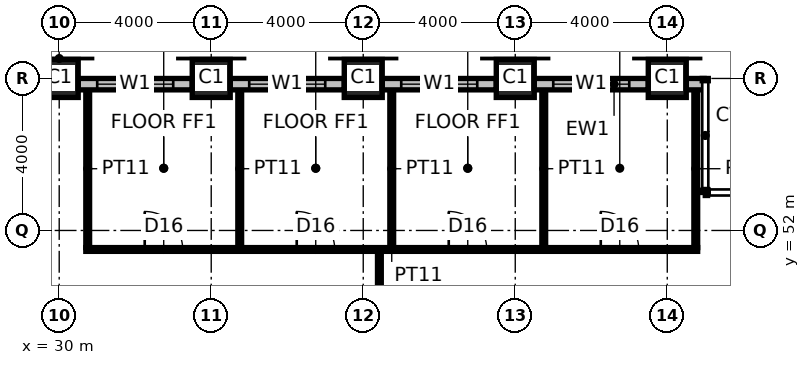
"""IFC4 building model, lengths in metres.
Left out: names, types, materials, properties, quantities, classifications, styles, units other than length and angle.
Written with IfcOpenShell. Run it as: python <this file> out.ifc"""

import sys

from ifc_helpers import new_model, si_unit, direction, frame, frame_2d, origin, origin_2d, place, context, subcontext, project, spatial, rectangle, hollow_rectangle, extrude, element, fill, save


model = new_model("IFC4")
c1 = context("Model", 3, precision=1e-05, world=origin(), true_north=direction((0.0, 1.0)))
c2 = subcontext(c1, "Body", "Model", "MODEL_VIEW")
j1 = project(units=[si_unit("LENGTHUNIT", "METRE"), si_unit("PLANEANGLEUNIT", "RADIAN")], contexts=[c1])
p1 = place(None, origin())
s1 = spatial("IfcSite", under=j1, at=p1, CompositionType="ELEMENT")
p2 = place(p1, origin())
s2 = spatial("IfcBuilding", under=s1, at=p2, CompositionType="ELEMENT")
p3 = place(p2, frame((0.0, 0.0, 214.2)))
s3 = spatial("IfcBuildingStorey", under=s2, at=p3, CompositionType="ELEMENT", Elevation=214.2)
for number, where, z_axis, x_axis in (
    (1, (30.0, 56.0, 0.0), (0.0, 0.0, 1.0), (1.0, 0.0, 0.0)),
    (2, (34.0, 56.0, 0.0), (0.0, 0.0, 1.0), (1.0, 0.0, 0.0)),
    (3, (38.0, 56.0, 0.0), (0.0, 0.0, 1.0), (1.0, 0.0, 0.0)),
    (4, (42.0, 56.0, 0.0), (0.0, 0.0, 1.0), (1.0, 0.0, 0.0)),
    (5, (46.0, 56.0, 0.0), (0.0, 0.0, 1.0), (1.0, 0.0, 0.0)),
):
    element("IfcColumn", number, at=place(p3, frame(where, z_axis=z_axis, x_axis=x_axis)), inside=s3, PredefinedType="COLUMN", context=c2, shape_type="SweptSolid", body=[
        extrude(hollow_rectangle(XDim=1.0, YDim=1.0, WallThickness=0.1, at=origin_2d()), origin(), (0.0, 0.0, 1.0), 4.0),
    ])
p4 = place(p3, frame((30.7, 51.5, 0.0), z_axis=(0.0, 0.0, 1.0), x_axis=(1.0, 0.0, 0.0)))
e6 = element("IfcWall", 6, at=p4, inside=s3, PredefinedType="PARTITIONING", context=c2, shape_type="SweptSolid", body=[
    extrude(rectangle(XDim=16.1, YDim=0.1, at=frame_2d((8.05, 0.0))), origin(), (0.0, 0.0, 1.0), 3.85),
])
p5 = place(p4, frame((1.55, 0.0, 0.0)))
e7 = element("IfcOpeningElement", 7, at=p5, cuts=e6, PredefinedType="OPENING", context=c2, shape_type="SweptSolid", body=[
    extrude(rectangle(XDim=1.0, YDim=2.2, at=frame_2d((0.5, 1.1))), frame((0.0, 0.06, 0.0), z_axis=(0.0, -1.0, 0.0), x_axis=(1.0, 0.0, 0.0)), (0.0, 0.0, 1.0), 0.12),
])
p6 = place(p4, frame((5.55, 0.0, 0.0)))
e8 = element("IfcOpeningElement", 8, at=p6, cuts=e6, PredefinedType="OPENING", context=c2, shape_type="SweptSolid", body=[
    extrude(rectangle(XDim=1.0, YDim=2.2, at=frame_2d((0.5, 1.1))), frame((0.0, 0.06, 0.0), z_axis=(0.0, -1.0, 0.0), x_axis=(1.0, 0.0, 0.0)), (0.0, 0.0, 1.0), 0.12),
])
p7 = place(p4, frame((9.55, 0.0, 0.0)))
e9 = element("IfcOpeningElement", 9, at=p7, cuts=e6, PredefinedType="OPENING", context=c2, shape_type="SweptSolid", body=[
    extrude(rectangle(XDim=1.0, YDim=2.2, at=frame_2d((0.5, 1.1))), frame((0.0, 0.06, 0.0), z_axis=(0.0, -1.0, 0.0), x_axis=(1.0, 0.0, 0.0)), (0.0, 0.0, 1.0), 0.12),
])
p8 = place(p4, frame((13.55, 0.0, 0.0)))
e10 = element("IfcOpeningElement", 10, at=p8, cuts=e6, PredefinedType="OPENING", context=c2, shape_type="SweptSolid", body=[
    extrude(rectangle(XDim=1.0, YDim=2.2, at=frame_2d((0.5, 1.1))), frame((0.0, 0.06, 0.0), z_axis=(0.0, -1.0, 0.0), x_axis=(1.0, 0.0, 0.0)), (0.0, 0.0, 1.0), 0.12),
])
for number, where, z_axis, x_axis in (
    (11, (30.75, 51.55, 0.0), (0.0, 0.0, 1.0), (0.0, 1.0, 0.0)),
    (12, (34.75, 51.55, 0.0), (0.0, 0.0, 1.0), (0.0, 1.0, 0.0)),
    (13, (38.75, 51.55, 0.0), (0.0, 0.0, 1.0), (0.0, 1.0, 0.0)),
    (14, (42.75, 51.55, 0.0), (0.0, 0.0, 1.0), (0.0, 1.0, 0.0)),
    (15, (46.75, 51.55, 0.0), (0.0, 0.0, 1.0), (0.0, 1.0, 0.0)),
):
    element("IfcWall", number, at=place(p3, frame(where, z_axis=z_axis, x_axis=x_axis)), inside=s3, PredefinedType="PARTITIONING", context=c2, shape_type="SweptSolid", body=[
        extrude(rectangle(XDim=4.15, YDim=0.1, at=frame_2d((2.075, 0.0))), origin(), (0.0, 0.0, 1.0), 3.85),
    ])
p9 = place(p3, frame((38.425, 51.45, 0.0), z_axis=(0.0, 0.0, 1.0), x_axis=(0.0, -1.0, 0.0)))
e16 = element("IfcWall", 16, at=p9, inside=s3, PredefinedType="PARTITIONING", context=c2, shape_type="SweptSolid", body=[
    extrude(rectangle(XDim=14.95, YDim=0.1, at=frame_2d((7.475, 0.0))), origin(), (0.0, 0.0, 1.0), 2.95),
])
p10 = place(p9, frame((6.975, 0.0, 0.0)))
e17 = element("IfcOpeningElement", 17, at=p10, cuts=e16, PredefinedType="OPENING", context=c2, shape_type="SweptSolid", body=[
    extrude(rectangle(XDim=1.0, YDim=2.2, at=frame_2d((0.5, 1.1))), frame((0.0, 0.06, 0.0), z_axis=(0.0, -1.0, 0.0), x_axis=(1.0, 0.0, 0.0)), (0.0, 0.0, 1.0), 0.12),
])
p11 = place(p3, frame((33.5, 55.85, 0.0), z_axis=(0.0, 0.0, 1.0), x_axis=(-1.0, 0.0, 0.0)))
e18 = element("IfcWall", 18, at=p11, inside=s3, PredefinedType="ELEMENTEDWALL", context=c2, shape_type="SweptSolid", body=[
    extrude(rectangle(XDim=3.0, YDim=0.3, at=frame_2d((1.5, 0.0))), origin(), (0.0, 0.0, 1.0), 2.85),
])
p12 = place(p11, frame((0.5, 0.0, 0.8)))
e19 = element("IfcOpeningElement", 19, at=p12, cuts=e18, PredefinedType="OPENING", context=c2, shape_type="SweptSolid", body=[
    extrude(rectangle(XDim=2.0, YDim=2.0, at=frame_2d((1.0, 1.0))), frame((0.0, 0.16, 0.0), z_axis=(0.0, -1.0, 0.0), x_axis=(1.0, 0.0, 0.0)), (0.0, 0.0, 1.0), 0.32),
])
p13 = place(p3, frame((37.5, 55.85, 0.0), z_axis=(0.0, 0.0, 1.0), x_axis=(-1.0, 0.0, 0.0)))
e20 = element("IfcWall", 20, at=p13, inside=s3, PredefinedType="ELEMENTEDWALL", context=c2, shape_type="SweptSolid", body=[
    extrude(rectangle(XDim=3.0, YDim=0.3, at=frame_2d((1.5, 0.0))), origin(), (0.0, 0.0, 1.0), 2.85),
])
p14 = place(p13, frame((0.5, 0.0, 0.8)))
e21 = element("IfcOpeningElement", 21, at=p14, cuts=e20, PredefinedType="OPENING", context=c2, shape_type="SweptSolid", body=[
    extrude(rectangle(XDim=2.0, YDim=2.0, at=frame_2d((1.0, 1.0))), frame((0.0, 0.16, 0.0), z_axis=(0.0, -1.0, 0.0), x_axis=(1.0, 0.0, 0.0)), (0.0, 0.0, 1.0), 0.32),
])
p15 = place(p3, frame((41.5, 55.85, 0.0), z_axis=(0.0, 0.0, 1.0), x_axis=(-1.0, 0.0, 0.0)))
e22 = element("IfcWall", 22, at=p15, inside=s3, PredefinedType="ELEMENTEDWALL", context=c2, shape_type="SweptSolid", body=[
    extrude(rectangle(XDim=3.0, YDim=0.3, at=frame_2d((1.5, 0.0))), origin(), (0.0, 0.0, 1.0), 2.85),
])
p16 = place(p15, frame((0.5, 0.0, 0.8)))
e23 = element("IfcOpeningElement", 23, at=p16, cuts=e22, PredefinedType="OPENING", context=c2, shape_type="SweptSolid", body=[
    extrude(rectangle(XDim=2.0, YDim=2.0, at=frame_2d((1.0, 1.0))), frame((0.0, 0.16, 0.0), z_axis=(0.0, -1.0, 0.0), x_axis=(1.0, 0.0, 0.0)), (0.0, 0.0, 1.0), 0.32),
])
p17 = place(p3, frame((45.5, 55.85, 0.0), z_axis=(0.0, 0.0, 1.0), x_axis=(-1.0, 0.0, 0.0)))
e24 = element("IfcWall", 24, at=p17, inside=s3, PredefinedType="ELEMENTEDWALL", context=c2, shape_type="SweptSolid", body=[
    extrude(rectangle(XDim=3.0, YDim=0.3, at=frame_2d((1.5, 0.0))), origin(), (0.0, 0.0, 1.0), 2.85),
])
p18 = place(p17, frame((0.5, 0.0, 0.8)))
e25 = element("IfcOpeningElement", 25, at=p18, cuts=e24, PredefinedType="OPENING", context=c2, shape_type="SweptSolid", body=[
    extrude(rectangle(XDim=2.0, YDim=2.0, at=frame_2d((1.0, 1.0))), frame((0.0, 0.16, 0.0), z_axis=(0.0, -1.0, 0.0), x_axis=(1.0, 0.0, 0.0)), (0.0, 0.0, 1.0), 0.32),
])
p19 = place(p3, frame((46.97, 55.85, 0.0), z_axis=(0.0, 0.0, 1.0), x_axis=(-1.0, 0.0, 0.0)))
e26 = element("IfcWall", 26, at=p19, inside=s3, PredefinedType="ELEMENTEDWALL", context=c2, shape_type="SweptSolid", body=[
    extrude(rectangle(XDim=0.47, YDim=0.3, at=frame_2d((0.235, 0.0))), origin(), (0.0, 0.0, 1.0), 2.95),
])
p20 = place(p5, origin())
e27 = element("IfcDoor", 27, at=p20, inside=s3, OperationType="SINGLE_SWING_LEFT", PredefinedType="DOOR", context=c2, shape_type="SweptSolid", body=[
    extrude(rectangle(XDim=1.0, YDim=2.2, at=frame_2d((0.5, 1.1))), frame((0.0, 0.025, 0.0), z_axis=(0.0, -1.0, 0.0), x_axis=(1.0, 0.0, 0.0)), (0.0, 0.0, 1.0), 0.05),
])
fill(e7, e27)
p21 = place(p6, origin())
e28 = element("IfcDoor", 28, at=p21, inside=s3, OperationType="SINGLE_SWING_LEFT", PredefinedType="DOOR", context=c2, shape_type="SweptSolid", body=[
    extrude(rectangle(XDim=1.0, YDim=2.2, at=frame_2d((0.5, 1.1))), frame((0.0, 0.025, 0.0), z_axis=(0.0, -1.0, 0.0), x_axis=(1.0, 0.0, 0.0)), (0.0, 0.0, 1.0), 0.05),
])
fill(e8, e28)
p22 = place(p7, origin())
e29 = element("IfcDoor", 29, at=p22, inside=s3, OperationType="SINGLE_SWING_LEFT", PredefinedType="DOOR", context=c2, shape_type="SweptSolid", body=[
    extrude(rectangle(XDim=1.0, YDim=2.2, at=frame_2d((0.5, 1.1))), frame((0.0, 0.025, 0.0), z_axis=(0.0, -1.0, 0.0), x_axis=(1.0, 0.0, 0.0)), (0.0, 0.0, 1.0), 0.05),
])
fill(e9, e29)
p23 = place(p8, origin())
e30 = element("IfcDoor", 30, at=p23, inside=s3, OperationType="SINGLE_SWING_LEFT", PredefinedType="DOOR", context=c2, shape_type="SweptSolid", body=[
    extrude(rectangle(XDim=1.0, YDim=2.2, at=frame_2d((0.5, 1.1))), frame((0.0, 0.025, 0.0), z_axis=(0.0, -1.0, 0.0), x_axis=(1.0, 0.0, 0.0)), (0.0, 0.0, 1.0), 0.05),
])
fill(e10, e30)
p24 = place(p12, origin())
e31 = element("IfcWindow", 31, at=p24, inside=s3, PartitioningType="SINGLE_PANEL", PredefinedType="WINDOW", context=c2, shape_type="SweptSolid", body=[
    extrude(rectangle(XDim=2.0, YDim=2.0, at=frame_2d((1.0, 1.0))), frame((0.0, 0.03, 0.0), z_axis=(0.0, -1.0, 0.0), x_axis=(1.0, 0.0, 0.0)), (0.0, 0.0, 1.0), 0.06),
])
fill(e19, e31)
p25 = place(p14, origin())
e32 = element("IfcWindow", 32, at=p25, inside=s3, PartitioningType="SINGLE_PANEL", PredefinedType="WINDOW", context=c2, shape_type="SweptSolid", body=[
    extrude(rectangle(XDim=2.0, YDim=2.0, at=frame_2d((1.0, 1.0))), frame((0.0, 0.03, 0.0), z_axis=(0.0, -1.0, 0.0), x_axis=(1.0, 0.0, 0.0)), (0.0, 0.0, 1.0), 0.06),
])
fill(e21, e32)
p26 = place(p16, origin())
e33 = element("IfcWindow", 33, at=p26, inside=s3, PartitioningType="SINGLE_PANEL", PredefinedType="WINDOW", context=c2, shape_type="SweptSolid", body=[
    extrude(rectangle(XDim=2.0, YDim=2.0, at=frame_2d((1.0, 1.0))), frame((0.0, 0.03, 0.0), z_axis=(0.0, -1.0, 0.0), x_axis=(1.0, 0.0, 0.0)), (0.0, 0.0, 1.0), 0.06),
])
fill(e23, e33)
p27 = place(p18, origin())
e34 = element("IfcWindow", 34, at=p27, inside=s3, PartitioningType="SINGLE_PANEL", PredefinedType="WINDOW", context=c2, shape_type="SweptSolid", body=[
    extrude(rectangle(XDim=2.0, YDim=2.0, at=frame_2d((1.0, 1.0))), frame((0.0, 0.03, 0.0), z_axis=(0.0, -1.0, 0.0), x_axis=(1.0, 0.0, 0.0)), (0.0, 0.0, 1.0), 0.06),
])
fill(e25, e34)
save(model, sys.argv[1])
